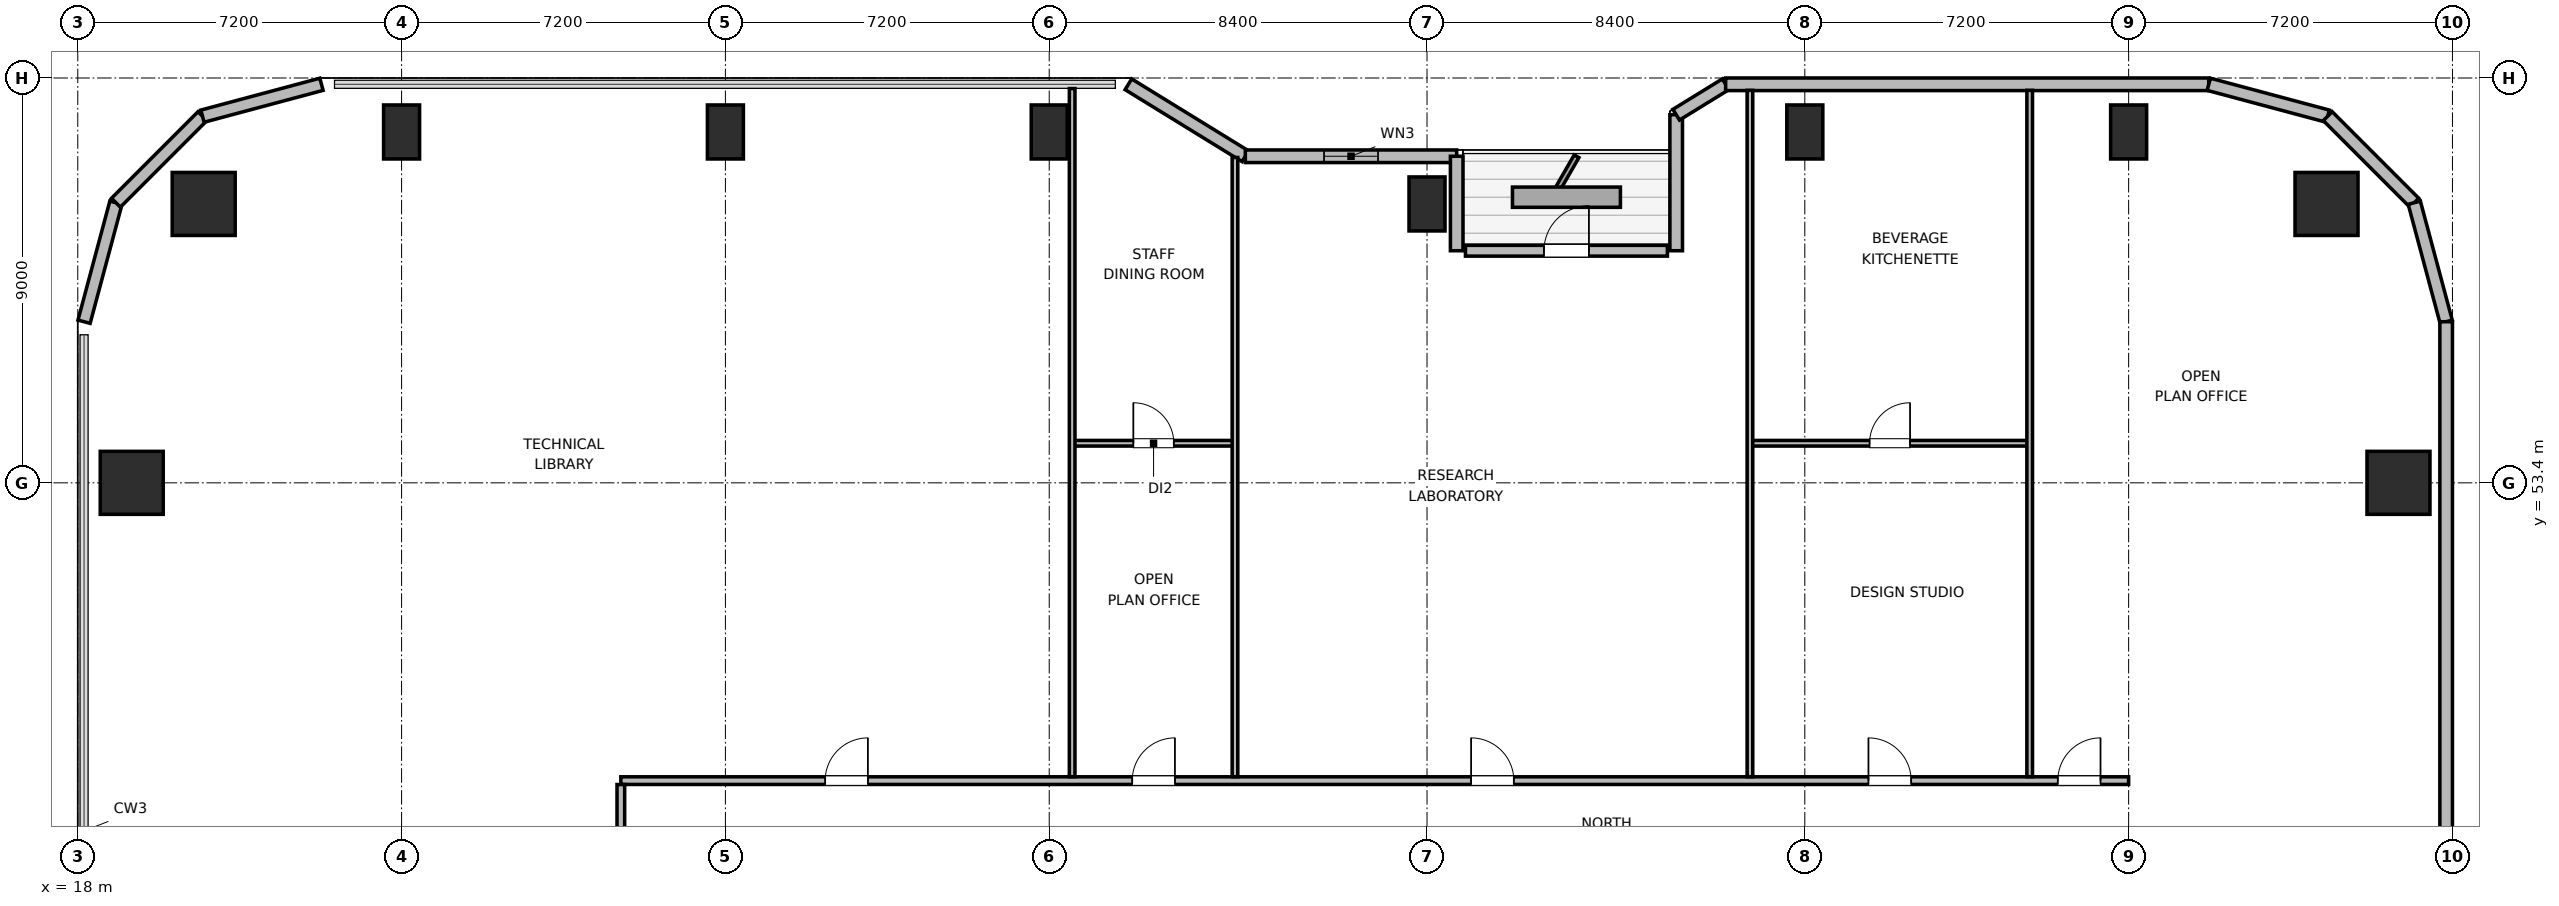
"""IFC4 building model, lengths in metres.
Left out: names, types, materials, properties, quantities, classifications, styles, units other than length and angle.
Written with IfcOpenShell. Run it as: python <this file> out.ifc"""

import sys

from ifc_helpers import new_model, si_unit, direction, frame, frame_2d, origin, origin_2d, place, context, subcontext, project, spatial, rectangle, circle, extrude, element, fill, save


model = new_model("IFC4")
c1 = context("Model", 3, precision=1e-05, world=origin(), true_north=direction((0.0, 1.0)))
c2 = subcontext(c1, "Body", "Model", "MODEL_VIEW")
j1 = project(units=[si_unit("LENGTHUNIT", "METRE"), si_unit("PLANEANGLEUNIT", "RADIAN")], contexts=[c1])
p1 = place(None, origin())
s1 = spatial("IfcSite", under=j1, at=p1, CompositionType="ELEMENT")
p2 = place(p1, origin())
s2 = spatial("IfcBuilding", under=s1, at=p2, CompositionType="ELEMENT")
p3 = place(p2, frame((0.0, 0.0, 150.6)))
s3 = spatial("IfcBuildingStorey", under=s2, at=p3, CompositionType="ELEMENT", Elevation=150.6)
for number, where, z_axis, x_axis in (
    (1, (68.0, 59.6, 0.0), (0.0, 0.0, 1.0), (1.0, 0.0, 0.0)),
    (2, (20.8, 59.6, 0.0), (0.0, 0.0, 1.0), (1.0, 0.0, 0.0)),
):
    element("IfcColumn", number, at=place(p3, frame(where, z_axis=z_axis, x_axis=x_axis)), inside=s3, PredefinedType="COLUMN", context=c2, shape_type="SweptSolid", body=[
        extrude(circle(Radius=0.7, at=origin_2d()), origin(), (0.0, 0.0, 1.0), 3.9),
    ])
for number, where, z_axis, x_axis in (
    (3, (25.2, 61.2, 0.0), (0.0, 0.0, 1.0), (1.0, 0.0, 0.0)),
    (4, (32.4, 61.2, 0.0), (0.0, 0.0, 1.0), (1.0, 0.0, 0.0)),
    (5, (39.6, 61.2, 0.0), (0.0, 0.0, 1.0), (1.0, 0.0, 0.0)),
    (6, (48.0, 59.6, 0.0), (0.0, 0.0, 1.0), (1.0, 0.0, 0.0)),
    (7, (56.4, 61.2, 0.0), (0.0, 0.0, 1.0), (1.0, 0.0, 0.0)),
    (8, (63.6, 61.2, 0.0), (0.0, 0.0, 1.0), (1.0, 0.0, 0.0)),
):
    element("IfcColumn", number, at=place(p3, frame(where, z_axis=z_axis, x_axis=x_axis)), inside=s3, PredefinedType="COLUMN", context=c2, shape_type="SweptSolid", body=[
        extrude(rectangle(XDim=0.8, YDim=1.2, at=origin_2d()), origin(), (0.0, 0.0, 1.0), 3.9),
    ])
for number, where, z_axis, x_axis in (
    (9, (19.2, 53.4, 0.0), (0.0, 0.0, 1.0), (1.0, 0.0, 0.0)),
    (10, (69.6, 53.4, 0.0), (0.0, 0.0, 1.0), (1.0, 0.0, 0.0)),
):
    element("IfcColumn", number, at=place(p3, frame(where, z_axis=z_axis, x_axis=x_axis)), inside=s3, PredefinedType="COLUMN", context=c2, shape_type="SweptSolid", body=[
        extrude(rectangle(XDim=1.4, YDim=1.4, at=origin_2d()), origin(), (0.0, 0.0, 1.0), 3.9),
    ])
p4 = place(p3, frame((18.14, 56.982, 0.0), z_axis=(0.0, 0.0, 1.0), x_axis=(0.258672222976, 0.9659651552, 0.0)))
e11 = element("IfcWall", 11, at=p4, inside=s3, PredefinedType="SOLIDWALL", context=c2, shape_type="SweptSolid", body=[
    extrude(rectangle(XDim=2.739, YDim=0.28, at=frame_2d((1.37, 0.0))), origin(), (0.0, 0.0, 1.0), 3.68),
])
p5 = place(p3, frame((18.848, 59.627, 0.0), z_axis=(0.0, 0.0, 1.0), x_axis=(0.707106781187, 0.707106781187, 0.0)))
e12 = element("IfcWall", 12, at=p5, inside=s3, PredefinedType="SOLIDWALL", context=c2, shape_type="SweptSolid", body=[
    extrude(rectangle(XDim=2.721, YDim=0.28, at=frame_2d((1.36, 0.0))), origin(), (0.0, 0.0, 1.0), 3.68),
])
p6 = place(p3, frame((20.772, 61.552, 0.0), z_axis=(0.0, 0.0, 1.0), x_axis=(0.965971118627, 0.258649952598, 0.0)))
e13 = element("IfcWall", 13, at=p6, inside=s3, PredefinedType="SOLIDWALL", context=c2, shape_type="SweptSolid", body=[
    extrude(rectangle(XDim=2.739, YDim=0.28, at=frame_2d((1.37, 0.0))), origin(), (0.0, 0.0, 1.0), 3.68),
])
p7 = place(p3, frame((41.36, 62.26, 0.0), z_axis=(0.0, 0.0, 1.0), x_axis=(0.851652825334, -0.524106349037, 0.0)))
e14 = element("IfcWall", 14, at=p7, inside=s3, PredefinedType="SOLIDWALL", context=c2, shape_type="SweptSolid", body=[
    extrude(rectangle(XDim=3.053, YDim=0.28, at=frame_2d((1.526, 0.0))), origin(), (0.0, 0.0, 1.0), 2.265),
])
p8 = place(p3, frame((43.96, 60.66, 0.0), z_axis=(0.0, 0.0, 1.0), x_axis=(1.0, 0.0, 0.0)))
e15 = element("IfcWall", 15, at=p8, inside=s3, PredefinedType="SOLIDWALL", context=c2, shape_type="SweptSolid", body=[
    extrude(rectangle(XDim=4.699, YDim=0.28, at=frame_2d((2.35, 0.0))), origin(), (0.0, 0.0, 1.0), 2.265),
])
p9 = place(p8, frame((1.75, 0.0, 0.85)))
e16 = element("IfcOpeningElement", 16, at=p9, cuts=e15, PredefinedType="OPENING", context=c2, shape_type="SweptSolid", body=[
    extrude(rectangle(XDim=1.2, YDim=1.1, at=frame_2d((0.6, 0.55))), frame((0.0, 0.15, 0.0), z_axis=(0.0, -1.0, 0.0), x_axis=(1.0, 0.0, 0.0)), (0.0, 0.0, 1.0), 0.3),
])
p10 = place(p3, frame((48.66, 60.66, 0.0), z_axis=(0.0, 0.0, 1.0), x_axis=(0.0, -1.0, 0.0)))
e17 = element("IfcWall", 17, at=p10, inside=s3, PredefinedType="SOLIDWALL", context=c2, shape_type="SweptSolid", body=[
    extrude(rectangle(XDim=2.1, YDim=0.28, at=frame_2d((1.05, 0.0))), origin(), (0.0, 0.0, 1.0), 2.265),
])
p11 = place(p3, frame((48.855, 58.56, 0.0), z_axis=(0.0, 0.0, 1.0), x_axis=(1.0, 0.0, 0.0)))
e18 = element("IfcWall", 18, at=p11, inside=s3, PredefinedType="SOLIDWALL", context=c2, shape_type="SweptSolid", body=[
    extrude(rectangle(XDim=4.49, YDim=0.24, at=frame_2d((2.245, 0.0))), origin(), (0.0, 0.0, 1.0), 3.68),
])
p12 = place(p11, frame((1.745, 0.0, 0.0)))
e19 = element("IfcOpeningElement", 19, at=p12, cuts=e18, PredefinedType="OPENING", context=c2, shape_type="SweptSolid", body=[
    extrude(rectangle(XDim=1.0, YDim=2.02, at=frame_2d((0.5, 1.01))), frame((0.0, 0.13, 0.0), z_axis=(0.0, -1.0, 0.0), x_axis=(1.0, 0.0, 0.0)), (0.0, 0.0, 1.0), 0.26),
])
p13 = place(p3, frame((53.54, 58.56, 0.0), z_axis=(0.0, 0.0, 1.0), x_axis=(0.0, 1.0, 0.0)))
e20 = element("IfcWall", 20, at=p13, inside=s3, PredefinedType="SOLIDWALL", context=c2, shape_type="SweptSolid", body=[
    extrude(rectangle(XDim=3.024, YDim=0.28, at=frame_2d((1.512, 0.0))), origin(), (0.0, 0.0, 1.0), 2.265),
])
p14 = place(p3, frame((53.54, 61.584, 0.0), z_axis=(0.0, 0.0, 1.0), x_axis=(0.851801140441, 0.523865266212, 0.0)))
e21 = element("IfcWall", 21, at=p14, inside=s3, PredefinedType="SOLIDWALL", context=c2, shape_type="SweptSolid", body=[
    extrude(rectangle(XDim=1.291, YDim=0.28, at=frame_2d((0.646, 0.0))), origin(), (0.0, 0.0, 1.0), 3.68),
])
p15 = place(p3, frame((54.64, 62.26, 0.0), z_axis=(0.0, 0.0, 1.0), x_axis=(1.0, 0.0, 0.0)))
e22 = element("IfcWall", 22, at=p15, inside=s3, PredefinedType="SOLIDWALL", context=c2, shape_type="SweptSolid", body=[
    extrude(rectangle(XDim=10.742, YDim=0.28, at=frame_2d((5.371, 0.0))), origin(), (0.0, 0.0, 1.0), 3.68),
])
p16 = place(p3, frame((65.382, 62.26, 0.0), z_axis=(0.0, 0.0, 1.0), x_axis=(0.965971118627, -0.258649952598, 0.0)))
e23 = element("IfcWall", 23, at=p16, inside=s3, PredefinedType="SOLIDWALL", context=c2, shape_type="SweptSolid", body=[
    extrude(rectangle(XDim=2.739, YDim=0.28, at=frame_2d((1.37, 0.0))), origin(), (0.0, 0.0, 1.0), 3.68),
])
p17 = place(p3, frame((68.028, 61.552, 0.0), z_axis=(0.0, 0.0, 1.0), x_axis=(0.707061915429, -0.707151644098, 0.0)))
e24 = element("IfcWall", 24, at=p17, inside=s3, PredefinedType="SOLIDWALL", context=c2, shape_type="SweptSolid", body=[
    extrude(rectangle(XDim=2.721, YDim=0.28, at=frame_2d((1.36, 0.0))), origin(), (0.0, 0.0, 1.0), 3.68),
])
p18 = place(p3, frame((69.951, 59.627, 0.0), z_axis=(0.0, 0.0, 1.0), x_axis=(0.258672222976, -0.9659651552, 0.0)))
e25 = element("IfcWall", 25, at=p18, inside=s3, PredefinedType="SOLIDWALL", context=c2, shape_type="SweptSolid", body=[
    extrude(rectangle(XDim=2.739, YDim=0.28, at=frame_2d((1.37, 0.0))), origin(), (0.0, 0.0, 1.0), 3.68),
])
p19 = place(p3, frame((70.66, 56.982, 0.0), z_axis=(0.0, 0.0, 1.0), x_axis=(0.0, -1.0, 0.0)))
e26 = element("IfcWall", 26, at=p19, inside=s3, PredefinedType="SOLIDWALL", context=c2, shape_type="SweptSolid", body=[
    extrude(rectangle(XDim=14.242, YDim=0.28, at=frame_2d((7.121, 0.0))), origin(), (0.0, 0.0, 1.0), 3.68),
])
p20 = place(p3, frame((30.075, 46.78, 0.0), z_axis=(0.0, 0.0, 1.0), x_axis=(1.0, 0.0, 0.0)))
e27 = element("IfcWall", 27, at=p20, inside=s3, PredefinedType="PARTITIONING", context=c2, shape_type="SweptSolid", body=[
    extrude(rectangle(XDim=33.525, YDim=0.17, at=frame_2d((16.763, 0.0))), origin(), (0.0, 0.0, 1.0), 3.68),
])
p21 = place(p20, frame((4.543, 0.0, 0.0)))
e28 = element("IfcOpeningElement", 28, at=p21, cuts=e27, PredefinedType="OPENING", context=c2, shape_type="SweptSolid", body=[
    extrude(rectangle(XDim=0.95, YDim=2.04, at=frame_2d((0.475, 1.02))), frame((0.0, 0.095, 0.0), z_axis=(0.0, -1.0, 0.0), x_axis=(1.0, 0.0, 0.0)), (0.0, 0.0, 1.0), 0.19),
])
p22 = place(p20, frame((11.37, 0.0, 0.0)))
e29 = element("IfcOpeningElement", 29, at=p22, cuts=e27, PredefinedType="OPENING", context=c2, shape_type="SweptSolid", body=[
    extrude(rectangle(XDim=0.95, YDim=2.04, at=frame_2d((0.475, 1.02))), frame((0.0, 0.095, 0.0), z_axis=(0.0, -1.0, 0.0), x_axis=(1.0, 0.0, 0.0)), (0.0, 0.0, 1.0), 0.19),
])
p23 = place(p20, frame((18.905, 0.0, 0.0)))
e30 = element("IfcOpeningElement", 30, at=p23, cuts=e27, PredefinedType="OPENING", context=c2, shape_type="SweptSolid", body=[
    extrude(rectangle(XDim=0.95, YDim=2.04, at=frame_2d((0.475, 1.02))), frame((0.0, 0.095, 0.0), z_axis=(0.0, -1.0, 0.0), x_axis=(1.0, 0.0, 0.0)), (0.0, 0.0, 1.0), 0.19),
])
p24 = place(p20, frame((27.74, 0.0, 0.0)))
e31 = element("IfcOpeningElement", 31, at=p24, cuts=e27, PredefinedType="OPENING", context=c2, shape_type="SweptSolid", body=[
    extrude(rectangle(XDim=0.95, YDim=2.04, at=frame_2d((0.475, 1.02))), frame((0.0, 0.095, 0.0), z_axis=(0.0, -1.0, 0.0), x_axis=(1.0, 0.0, 0.0)), (0.0, 0.0, 1.0), 0.19),
])
p25 = place(p20, frame((31.95, 0.0, 0.0)))
e32 = element("IfcOpeningElement", 32, at=p25, cuts=e27, PredefinedType="OPENING", context=c2, shape_type="SweptSolid", body=[
    extrude(rectangle(XDim=0.95, YDim=2.04, at=frame_2d((0.475, 1.02))), frame((0.0, 0.095, 0.0), z_axis=(0.0, -1.0, 0.0), x_axis=(1.0, 0.0, 0.0)), (0.0, 0.0, 1.0), 0.19),
])
p26 = place(p3, frame((30.075, 37.1, 0.0), z_axis=(0.0, 0.0, 1.0), x_axis=(0.0, 1.0, 0.0)))
e33 = element("IfcWall", 33, at=p26, inside=s3, PredefinedType="PARTITIONING", context=c2, shape_type="SweptSolid", body=[
    extrude(rectangle(XDim=9.593, YDim=0.17, at=frame_2d((4.796, 0.0))), origin(), (0.0, 0.0, 1.0), 3.68),
])
p27 = place(p26, frame((4.365, 0.0, 0.0)))
e34 = element("IfcOpeningElement", 34, at=p27, cuts=e33, PredefinedType="OPENING", context=c2, shape_type="SweptSolid", body=[
    extrude(rectangle(XDim=0.95, YDim=2.04, at=frame_2d((0.475, 1.02))), frame((0.0, 0.095, 0.0), z_axis=(0.0, -1.0, 0.0), x_axis=(1.0, 0.0, 0.0)), (0.0, 0.0, 1.0), 0.19),
])
p28 = place(p3, frame((40.11, 54.28, 0.0), z_axis=(0.0, 0.0, 1.0), x_axis=(1.0, 0.0, 0.0)))
e35 = element("IfcWall", 35, at=p28, inside=s3, PredefinedType="PARTITIONING", context=c2, shape_type="SweptSolid", body=[
    extrude(rectangle(XDim=3.62, YDim=0.125, at=frame_2d((1.81, 0.0))), origin(), (0.0, 0.0, 1.0), 3.68),
])
p29 = place(p28, frame((1.36, 0.0, 0.0)))
e36 = element("IfcOpeningElement", 36, at=p29, cuts=e35, PredefinedType="OPENING", context=c2, shape_type="SweptSolid", body=[
    extrude(rectangle(XDim=0.9, YDim=2.02, at=frame_2d((0.45, 1.01))), frame((0.0, 0.073, 0.0), z_axis=(0.0, -1.0, 0.0), x_axis=(1.0, 0.0, 0.0)), (0.0, 0.0, 1.0), 0.145),
])
p30 = place(p3, frame((40.11, 46.867, 0.0), z_axis=(0.0, 0.0, 1.0), x_axis=(0.0, 1.0, 0.0)))
e37 = element("IfcWall", 37, at=p30, inside=s3, PredefinedType="PARTITIONING", context=c2, shape_type="SweptSolid", body=[
    extrude(rectangle(XDim=15.298, YDim=0.125, at=frame_2d((7.649, 0.0))), origin(), (0.0, 0.0, 1.0), 3.043),
])
p31 = place(p3, frame((43.73, 46.867, 0.0), z_axis=(0.0, 0.0, 1.0), x_axis=(0.0, 1.0, 0.0)))
e38 = element("IfcWall", 38, at=p31, inside=s3, PredefinedType="PARTITIONING", context=c2, shape_type="SweptSolid", body=[
    extrude(rectangle(XDim=13.766, YDim=0.125, at=frame_2d((6.883, 0.0))), origin(), (0.0, 0.0, 1.0), 3.043),
])
p32 = place(p3, frame((55.18, 54.28, 0.0), z_axis=(0.0, 0.0, 1.0), x_axis=(1.0, 0.0, 0.0)))
e39 = element("IfcWall", 39, at=p32, inside=s3, PredefinedType="PARTITIONING", context=c2, shape_type="SweptSolid", body=[
    extrude(rectangle(XDim=6.22, YDim=0.125, at=frame_2d((3.11, 0.0))), origin(), (0.0, 0.0, 1.0), 3.68),
])
p33 = place(p32, frame((2.66, 0.0, 0.0)))
e40 = element("IfcOpeningElement", 40, at=p33, cuts=e39, PredefinedType="OPENING", context=c2, shape_type="SweptSolid", body=[
    extrude(rectangle(XDim=0.9, YDim=2.02, at=frame_2d((0.45, 1.01))), frame((0.0, 0.073, 0.0), z_axis=(0.0, -1.0, 0.0), x_axis=(1.0, 0.0, 0.0)), (0.0, 0.0, 1.0), 0.145),
])
p34 = place(p3, frame((55.18, 46.867, 0.0), z_axis=(0.0, 0.0, 1.0), x_axis=(0.0, 1.0, 0.0)))
e41 = element("IfcWall", 41, at=p34, inside=s3, PredefinedType="PARTITIONING", context=c2, shape_type="SweptSolid", body=[
    extrude(rectangle(XDim=15.258, YDim=0.125, at=frame_2d((7.629, 0.0))), origin(), (0.0, 0.0, 1.0), 3.043),
])
p35 = place(p3, frame((61.4, 46.867, 0.0), z_axis=(0.0, 0.0, 1.0), x_axis=(0.0, 1.0, 0.0)))
e42 = element("IfcWall", 42, at=p35, inside=s3, PredefinedType="PARTITIONING", context=c2, shape_type="SweptSolid", body=[
    extrude(rectangle(XDim=15.258, YDim=0.125, at=frame_2d((7.629, 0.0))), origin(), (0.0, 0.0, 1.0), 3.68),
])
p36 = place(p9, origin())
e43 = element("IfcWindow", 43, at=p36, inside=s3, PartitioningType="SINGLE_PANEL", PredefinedType="WINDOW", context=c2, shape_type="SweptSolid", body=[
    extrude(rectangle(XDim=1.2, YDim=1.1, at=frame_2d((0.6, 0.55))), frame((0.0, 0.03, 0.0), z_axis=(0.0, -1.0, 0.0), x_axis=(1.0, 0.0, 0.0)), (0.0, 0.0, 1.0), 0.06),
])
fill(e16, e43)
p37 = place(p12, origin())
e44 = element("IfcDoor", 44, at=p37, inside=s3, OperationType="SINGLE_SWING_RIGHT", PredefinedType="DOOR", context=c2, shape_type="SweptSolid", body=[
    extrude(rectangle(XDim=1.0, YDim=2.02, at=frame_2d((0.5, 1.01))), frame((0.0, 0.025, 0.0), z_axis=(0.0, -1.0, 0.0), x_axis=(1.0, 0.0, 0.0)), (0.0, 0.0, 1.0), 0.05),
])
fill(e19, e44)
p38 = place(p21, origin())
e45 = element("IfcDoor", 45, at=p38, inside=s3, OperationType="SINGLE_SWING_RIGHT", PredefinedType="DOOR", context=c2, shape_type="SweptSolid", body=[
    extrude(rectangle(XDim=0.95, YDim=2.04, at=frame_2d((0.475, 1.02))), frame((0.0, 0.025, 0.0), z_axis=(0.0, -1.0, 0.0), x_axis=(1.0, 0.0, 0.0)), (0.0, 0.0, 1.0), 0.05),
])
fill(e28, e45)
p39 = place(p29, origin())
e46 = element("IfcDoor", 46, at=p39, inside=s3, OperationType="SINGLE_SWING_LEFT", PredefinedType="DOOR", context=c2, shape_type="SweptSolid", body=[
    extrude(rectangle(XDim=0.9, YDim=2.02, at=frame_2d((0.45, 1.01))), frame((0.0, 0.025, 0.0), z_axis=(0.0, -1.0, 0.0), x_axis=(1.0, 0.0, 0.0)), (0.0, 0.0, 1.0), 0.05),
])
fill(e36, e46)
p40 = place(p22, origin())
e47 = element("IfcDoor", 47, at=p40, inside=s3, OperationType="SINGLE_SWING_RIGHT", PredefinedType="DOOR", context=c2, shape_type="SweptSolid", body=[
    extrude(rectangle(XDim=0.95, YDim=2.04, at=frame_2d((0.475, 1.02))), frame((0.0, 0.025, 0.0), z_axis=(0.0, -1.0, 0.0), x_axis=(1.0, 0.0, 0.0)), (0.0, 0.0, 1.0), 0.05),
])
fill(e29, e47)
p41 = place(p23, origin())
e48 = element("IfcDoor", 48, at=p41, inside=s3, OperationType="SINGLE_SWING_LEFT", PredefinedType="DOOR", context=c2, shape_type="SweptSolid", body=[
    extrude(rectangle(XDim=0.95, YDim=2.04, at=frame_2d((0.475, 1.02))), frame((0.0, 0.025, 0.0), z_axis=(0.0, -1.0, 0.0), x_axis=(1.0, 0.0, 0.0)), (0.0, 0.0, 1.0), 0.05),
])
fill(e30, e48)
p42 = place(p33, origin())
e49 = element("IfcDoor", 49, at=p42, inside=s3, OperationType="SINGLE_SWING_RIGHT", PredefinedType="DOOR", context=c2, shape_type="SweptSolid", body=[
    extrude(rectangle(XDim=0.9, YDim=2.02, at=frame_2d((0.45, 1.01))), frame((0.0, 0.025, 0.0), z_axis=(0.0, -1.0, 0.0), x_axis=(1.0, 0.0, 0.0)), (0.0, 0.0, 1.0), 0.05),
])
fill(e40, e49)
p43 = place(p24, origin())
e50 = element("IfcDoor", 50, at=p43, inside=s3, OperationType="SINGLE_SWING_LEFT", PredefinedType="DOOR", context=c2, shape_type="SweptSolid", body=[
    extrude(rectangle(XDim=0.95, YDim=2.04, at=frame_2d((0.475, 1.02))), frame((0.0, 0.025, 0.0), z_axis=(0.0, -1.0, 0.0), x_axis=(1.0, 0.0, 0.0)), (0.0, 0.0, 1.0), 0.05),
])
fill(e31, e50)
p44 = place(p25, origin())
e51 = element("IfcDoor", 51, at=p44, inside=s3, OperationType="SINGLE_SWING_RIGHT", PredefinedType="DOOR", context=c2, shape_type="SweptSolid", body=[
    extrude(rectangle(XDim=0.95, YDim=2.04, at=frame_2d((0.475, 1.02))), frame((0.0, 0.025, 0.0), z_axis=(0.0, -1.0, 0.0), x_axis=(1.0, 0.0, 0.0)), (0.0, 0.0, 1.0), 0.05),
])
fill(e32, e51)
save(model, sys.argv[1])
